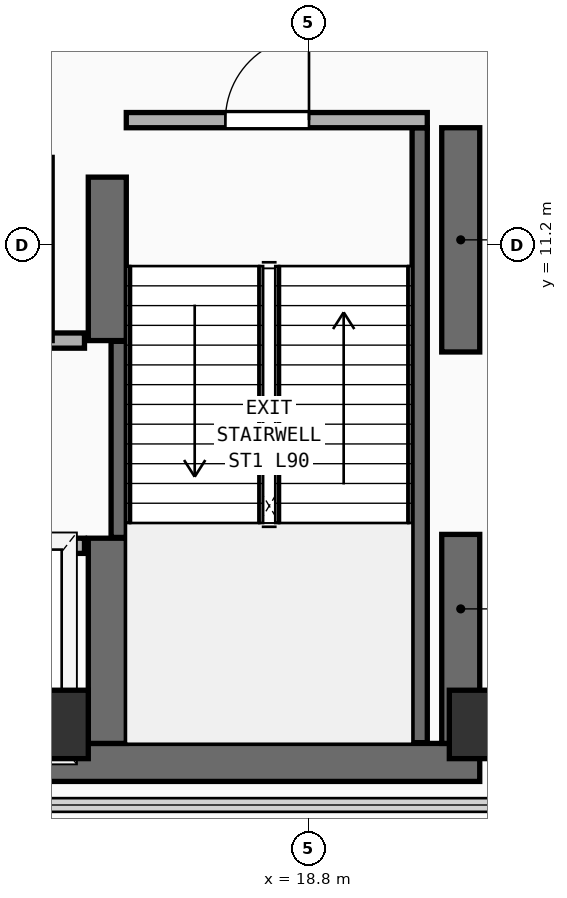
"""IFC4 building model, lengths in metres.
Left out: names, types, materials, properties, quantities, classifications, styles, units other than length and angle.
Written with IfcOpenShell. Run it as: python <this file> out.ifc"""

import sys

from ifc_helpers import new_model, si_unit, direction, frame, frame_2d, origin, origin_2d, place, context, subcontext, project, spatial, rectangle, extrude, element, fill, save


model = new_model("IFC4")
c1 = context("Model", 3, precision=1e-05, world=origin(), true_north=direction((0.0, 1.0)))
c2 = subcontext(c1, "Body", "Model", "MODEL_VIEW")
j1 = project(units=[si_unit("LENGTHUNIT", "METRE"), si_unit("PLANEANGLEUNIT", "RADIAN")], contexts=[c1])
p1 = place(None, origin())
s1 = spatial("IfcSite", under=j1, at=p1, CompositionType="ELEMENT")
p2 = place(p1, origin())
s2 = spatial("IfcBuilding", under=s1, at=p2, CompositionType="ELEMENT")
p3 = place(p2, frame((0.0, 0.0, 352.0)))
s3 = spatial("IfcBuildingStorey", under=s2, at=p3, CompositionType="ELEMENT", Elevation=352.0)
p4 = place(p3, frame((7.2, 4.4, 0.0), z_axis=(0.0, 0.0, 1.0), x_axis=(1.0, 0.0, 0.0)))
e1 = element("IfcWall", 1, at=p4, inside=s3, PredefinedType="SHEAR", context=c2, shape_type="SweptSolid", body=[
    extrude(rectangle(XDim=13.85, YDim=0.5, at=frame_2d((6.925, 0.0))), origin(), (0.0, 0.0, 1.0), 3.82),
])
p5 = place(p3, frame((20.8, 4.65, 0.0), z_axis=(0.0, 0.0, 1.0), x_axis=(0.0, 1.0, 0.0)))
e2 = element("IfcWall", 2, at=p5, inside=s3, PredefinedType="SHEAR", context=c2, shape_type="SweptSolid", body=[
    extrude(rectangle(XDim=2.75, YDim=0.5, at=frame_2d((1.375, 0.0))), origin(), (0.0, 0.0, 1.0), 3.82),
])
p6 = place(p3, frame((20.8, 9.8, 0.0), z_axis=(0.0, 0.0, 1.0), x_axis=(0.0, 1.0, 0.0)))
e3 = element("IfcWall", 3, at=p6, inside=s3, PredefinedType="SHEAR", context=c2, shape_type="SweptSolid", body=[
    extrude(rectangle(XDim=2.95, YDim=0.5, at=frame_2d((1.475, 0.0))), origin(), (0.0, 0.0, 1.0), 3.82),
])
p7 = place(p3, frame((16.15, 4.65, 0.0), z_axis=(0.0, 0.0, 1.0), x_axis=(0.0, 1.0, 0.0)))
e4 = element("IfcWall", 4, at=p7, inside=s3, PredefinedType="SHEAR", context=c2, shape_type="SweptSolid", body=[
    extrude(rectangle(XDim=2.7, YDim=0.5, at=frame_2d((1.35, 0.0))), origin(), (0.0, 0.0, 1.0), 3.82),
])
p8 = place(p3, frame((16.15, 9.95, 0.0), z_axis=(0.0, 0.0, 1.0), x_axis=(0.0, 1.0, 0.0)))
e5 = element("IfcWall", 5, at=p8, inside=s3, PredefinedType="SHEAR", context=c2, shape_type="SweptSolid", body=[
    extrude(rectangle(XDim=2.15, YDim=0.5, at=frame_2d((1.075, 0.0))), origin(), (0.0, 0.0, 1.0), 3.82),
])
for number, where, z_axis, x_axis in (
    (6, (15.45, 4.9, 0.0), (0.0, 0.0, 1.0), (1.0, 0.0, 0.0)),
    (7, (21.1, 4.9, 0.0), (0.0, 0.0, 1.0), (1.0, 0.0, 0.0)),
):
    element("IfcColumn", number, at=place(p3, frame(where, z_axis=z_axis, x_axis=x_axis)), inside=s3, PredefinedType="COLUMN", context=c2, shape_type="SweptSolid", body=[
        extrude(rectangle(XDim=0.9, YDim=0.9, at=origin_2d()), origin(), (0.0, 0.0, 1.0), 3.82),
    ])
p9 = place(p3, frame((16.3, 7.36, 0.0), z_axis=(0.0, 0.0, 1.0), x_axis=(0.0, 1.0, 0.0)))
e8 = element("IfcWall", 8, at=p9, inside=s3, PredefinedType="SHEAR", context=c2, shape_type="SweptSolid", body=[
    extrude(rectangle(XDim=2.58, YDim=0.2, at=frame_2d((1.29, 0.0))), origin(), (0.0, 0.0, 1.0), 3.82),
])
p10 = place(p3, frame((20.26, 4.66, 0.0), z_axis=(0.0, 0.0, 1.0), x_axis=(0.0, 1.0, 0.0)))
e9 = element("IfcWall", 9, at=p10, inside=s3, PredefinedType="SHEAR", context=c2, shape_type="SweptSolid", body=[
    extrude(rectangle(XDim=8.09, YDim=0.2, at=frame_2d((4.045, 0.0))), origin(), (0.0, 0.0, 1.0), 3.82),
])
p11 = place(p3, frame((16.4, 12.85, 0.0), z_axis=(0.0, 0.0, 1.0), x_axis=(1.0, 0.0, 0.0)))
e10 = element("IfcWall", 10, at=p11, inside=s3, PredefinedType="PARTITIONING", context=c2, shape_type="SweptSolid", body=[
    extrude(rectangle(XDim=3.96, YDim=0.2, at=frame_2d((1.98, 0.0))), origin(), (0.0, 0.0, 1.0), 3.82),
])
p12 = place(p11, frame((1.304, 0.0, 0.0)))
e11 = element("IfcOpeningElement", 11, at=p12, cuts=e10, PredefinedType="OPENING", context=c2, shape_type="SweptSolid", body=[
    extrude(rectangle(XDim=1.1, YDim=2.2, at=frame_2d((0.55, 1.1))), frame((0.0, 0.11, 0.0), z_axis=(0.0, -1.0, 0.0), x_axis=(1.0, 0.0, 0.0)), (0.0, 0.0, 1.0), 0.22),
])
p13 = place(p3, frame((7.5, 7.25, 0.0), z_axis=(0.0, 0.0, 1.0), x_axis=(1.0, 0.0, 0.0)))
e12 = element("IfcWall", 12, at=p13, inside=s3, PredefinedType="PARTITIONING", context=c2, shape_type="SweptSolid", body=[
    extrude(rectangle(XDim=8.35, YDim=0.2, at=frame_2d((4.175, 0.0))), origin(), (0.0, 0.0, 1.0), 3.82),
])
p14 = place(p13, frame((0.53, 0.0, 0.0)))
e13 = element("IfcOpeningElement", 13, at=p14, cuts=e12, PredefinedType="OPENING", context=c2, shape_type="SweptSolid", body=[
    extrude(rectangle(XDim=1.1, YDim=2.2, at=frame_2d((0.55, 1.1))), frame((0.0, 0.11, 0.0), z_axis=(0.0, -1.0, 0.0), x_axis=(1.0, 0.0, 0.0)), (0.0, 0.0, 1.0), 0.22),
])
p15 = place(p13, frame((2.37, 0.0, 0.0)))
e14 = element("IfcOpeningElement", 14, at=p15, cuts=e12, PredefinedType="OPENING", context=c2, shape_type="SweptSolid", body=[
    extrude(rectangle(XDim=1.1, YDim=2.2, at=frame_2d((0.55, 1.1))), frame((0.0, 0.11, 0.0), z_axis=(0.0, -1.0, 0.0), x_axis=(1.0, 0.0, 0.0)), (0.0, 0.0, 1.0), 0.22),
])
p16 = place(p13, frame((4.33, 0.0, 0.0)))
e15 = element("IfcOpeningElement", 15, at=p16, cuts=e12, PredefinedType="OPENING", context=c2, shape_type="SweptSolid", body=[
    extrude(rectangle(XDim=1.1, YDim=2.2, at=frame_2d((0.55, 1.1))), frame((0.0, 0.11, 0.0), z_axis=(0.0, -1.0, 0.0), x_axis=(1.0, 0.0, 0.0)), (0.0, 0.0, 1.0), 0.22),
])
p17 = place(p13, frame((6.5, 0.0, 0.0)))
e16 = element("IfcOpeningElement", 16, at=p17, cuts=e12, PredefinedType="OPENING", context=c2, shape_type="SweptSolid", body=[
    extrude(rectangle(XDim=1.1, YDim=2.2, at=frame_2d((0.55, 1.1))), frame((0.0, 0.11, 0.0), z_axis=(0.0, -1.0, 0.0), x_axis=(1.0, 0.0, 0.0)), (0.0, 0.0, 1.0), 0.22),
])
p18 = place(p3, frame((7.5, 9.95, 0.0), z_axis=(0.0, 0.0, 1.0), x_axis=(1.0, 0.0, 0.0)))
e17 = element("IfcWall", 17, at=p18, inside=s3, PredefinedType="PARTITIONING", context=c2, shape_type="SweptSolid", body=[
    extrude(rectangle(XDim=8.35, YDim=0.2, at=frame_2d((4.175, 0.0))), origin(), (0.0, 0.0, 1.0), 3.82),
])
p19 = place(p3, frame((15.35, 9.95, 0.0), z_axis=(0.0, 0.0, 1.0), x_axis=(0.0, 1.0, 0.0)))
e18 = element("IfcWall", 18, at=p19, inside=s3, PredefinedType="PARTITIONING", context=c2, shape_type="SweptSolid", body=[
    extrude(rectangle(XDim=2.41, YDim=0.15, at=frame_2d((1.205, 0.0))), origin(), (0.0, 0.0, 1.0), 3.82),
])
p20 = place(p12, frame((1.1, 0.0, 0.0), z_axis=(0.0, 0.0, 1.0), x_axis=(-1.0, 0.0, 0.0)))
e19 = element("IfcDoor", 19, at=p20, inside=s3, OperationType="SINGLE_SWING_LEFT", PredefinedType="DOOR", context=c2, shape_type="SweptSolid", body=[
    extrude(rectangle(XDim=1.1, YDim=2.2, at=frame_2d((0.55, 1.1))), frame((0.0, 0.025, 0.0), z_axis=(0.0, -1.0, 0.0), x_axis=(1.0, 0.0, 0.0)), (0.0, 0.0, 1.0), 0.05),
])
fill(e11, e19)
save(model, sys.argv[1])
